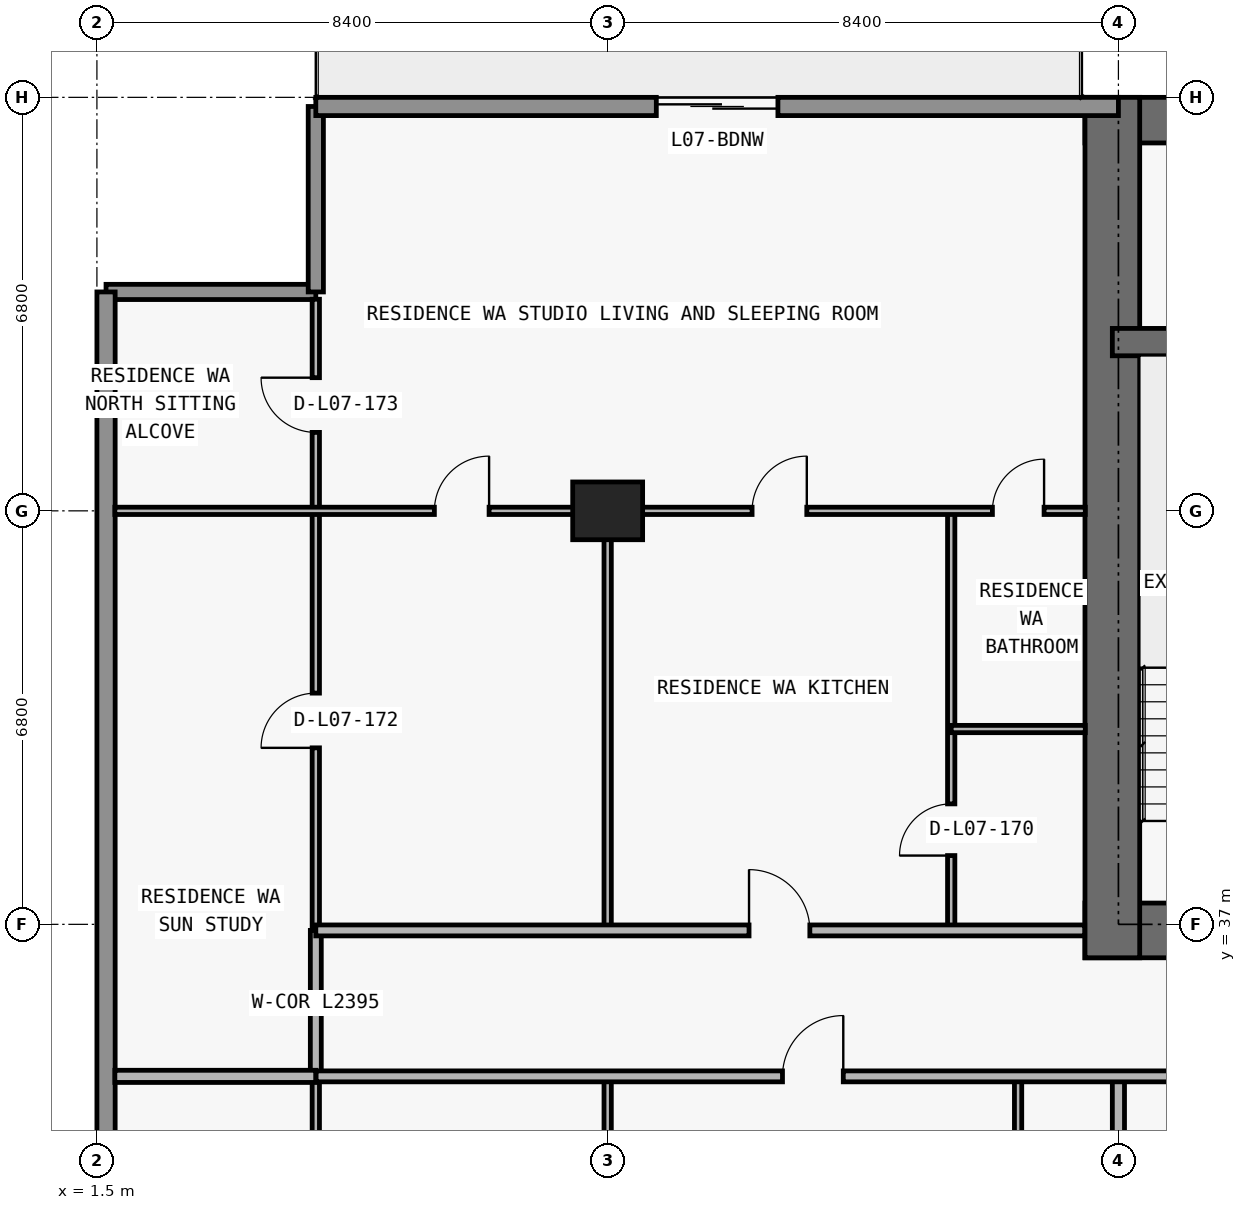
"""IFC4 building model, lengths in metres.
Left out: names, types, materials, properties, quantities, classifications, styles, units other than length and angle.
Written with IfcOpenShell. Run it as: python <this file> out.ifc"""

import sys

from ifc_helpers import new_model, si_unit, direction, frame, frame_2d, origin, origin_2d, place, context, subcontext, project, spatial, rectangle, extrude, element, fill, save


model = new_model("IFC4")
c1 = context("Model", 3, precision=1e-05, world=origin(), true_north=direction((0.0, 1.0)))
c2 = subcontext(c1, "Body", "Model", "MODEL_VIEW")
j1 = project(units=[si_unit("LENGTHUNIT", "METRE"), si_unit("PLANEANGLEUNIT", "RADIAN")], contexts=[c1])
p1 = place(None, origin())
s1 = spatial("IfcSite", under=j1, at=p1, CompositionType="ELEMENT")
p2 = place(p1, origin())
s2 = spatial("IfcBuilding", under=s1, at=p2, CompositionType="ELEMENT")
p3 = place(p2, frame((0.0, 0.0, 33.3)))
s3 = spatial("IfcBuildingStorey", under=s2, at=p3, CompositionType="ELEMENT", Elevation=33.3)
p4 = place(p3, frame((9.9, 43.8, 0.0), z_axis=(0.0, 0.0, 1.0), x_axis=(1.0, 0.0, 0.0)))
e1 = element("IfcColumn", 1, at=p4, inside=s3, PredefinedType="COLUMN", context=c2, shape_type="SweptSolid", body=[
    extrude(rectangle(XDim=1.15, YDim=0.95, at=origin_2d()), origin(), (0.0, 0.0, 1.0), 3.05),
])
p5 = place(p3, frame((17.75, 36.9, 0.0), z_axis=(0.0, 0.0, 1.0), x_axis=(1.0, 0.0, 0.0)))
e2 = element("IfcWall", 2, at=p5, inside=s3, PredefinedType="SHEAR", context=c2, shape_type="SweptSolid", body=[
    extrude(rectangle(XDim=42.3, YDim=0.9, at=frame_2d((21.15, 0.0))), origin(), (0.0, 0.0, 1.0), 3.05),
])
p6 = place(p5, frame((14.55, 0.0, 0.0)))
e3 = element("IfcOpeningElement", 3, at=p6, cuts=e2, PredefinedType="OPENING", context=c2, shape_type="SweptSolid", body=[
    extrude(rectangle(XDim=1.1, YDim=2.15, at=frame_2d((0.55, 1.075))), frame((0.0, 0.46, 0.0), z_axis=(0.0, -1.0, 0.0), x_axis=(1.0, 0.0, 0.0)), (0.0, 0.0, 1.0), 0.92),
])
p7 = place(p5, frame((6.4, 0.0, 0.0)))
e4 = element("IfcOpeningElement", 4, at=p7, cuts=e2, PredefinedType="OPENING", context=c2, shape_type="SweptSolid", body=[
    extrude(rectangle(XDim=1.05, YDim=2.15, at=frame_2d((0.525, 1.075))), frame((0.0, 0.46, 0.0), z_axis=(0.0, -1.0, 0.0), x_axis=(1.0, 0.0, 0.0)), (0.0, 0.0, 1.0), 0.92),
])
p8 = place(p5, frame((34.9, 0.0, 0.0)))
e5 = element("IfcOpeningElement", 5, at=p8, cuts=e2, PredefinedType="OPENING", context=c2, shape_type="SweptSolid", body=[
    extrude(rectangle(XDim=1.05, YDim=2.15, at=frame_2d((0.525, 1.075))), frame((0.0, 0.46, 0.0), z_axis=(0.0, -1.0, 0.0), x_axis=(1.0, 0.0, 0.0)), (0.0, 0.0, 1.0), 0.92),
])
p9 = place(p5, frame((11.012, 0.0, 0.0)))
e6 = element("IfcOpeningElement", 6, at=p9, cuts=e2, PredefinedType="OPENING", context=c2, shape_type="SweptSolid", body=[
    extrude(rectangle(XDim=1.05, YDim=2.15, at=frame_2d((0.525, 1.075))), frame((0.0, 0.46, 0.0), z_axis=(0.0, -1.0, 0.0), x_axis=(1.0, 0.0, 0.0)), (0.0, 0.0, 1.0), 0.92),
])
p10 = place(p5, frame((24.25, 0.0, 0.0)))
e7 = element("IfcOpeningElement", 7, at=p10, cuts=e2, PredefinedType="OPENING", context=c2, shape_type="SweptSolid", body=[
    extrude(rectangle(XDim=1.05, YDim=2.15, at=frame_2d((0.525, 1.075))), frame((0.0, 0.46, 0.0), z_axis=(0.0, -1.0, 0.0), x_axis=(1.0, 0.0, 0.0)), (0.0, 0.0, 1.0), 0.92),
])
p11 = place(p3, frame((17.75, 50.225, 0.0), z_axis=(0.0, 0.0, 1.0), x_axis=(1.0, 0.0, 0.0)))
e8 = element("IfcWall", 8, at=p11, inside=s3, PredefinedType="SHEAR", context=c2, shape_type="SweptSolid", body=[
    extrude(rectangle(XDim=42.3, YDim=0.75, at=frame_2d((21.15, 0.0))), origin(), (0.0, 0.0, 1.0), 3.05),
])
p12 = place(p3, frame((18.2, 36.45, 0.0), z_axis=(0.0, 0.0, 1.0), x_axis=(0.0, 1.0, 0.0)))
e9 = element("IfcWall", 9, at=p12, inside=s3, PredefinedType="SHEAR", context=c2, shape_type="SweptSolid", body=[
    extrude(rectangle(XDim=14.15, YDim=0.9, at=frame_2d((7.075, 0.0))), origin(), (0.0, 0.0, 1.0), 3.05),
])
p13 = place(p3, frame((18.2, 46.575, 0.0), z_axis=(0.0, 0.0, 1.0), x_axis=(1.0, 0.0, 0.0)))
e10 = element("IfcWall", 10, at=p13, inside=s3, PredefinedType="SHEAR", context=c2, shape_type="SweptSolid", body=[
    extrude(rectangle(XDim=41.4, YDim=0.45, at=frame_2d((20.7, 0.0))), origin(), (0.0, 0.0, 1.0), 3.05),
])
p14 = place(p13, frame((7.675, 0.0, 0.0)))
e11 = element("IfcOpeningElement", 11, at=p14, cuts=e10, PredefinedType="OPENING", context=c2, shape_type="SweptSolid", body=[
    extrude(rectangle(XDim=1.05, YDim=2.15, at=frame_2d((0.525, 1.075))), frame((0.0, 0.235, 0.0), z_axis=(0.0, -1.0, 0.0), x_axis=(1.0, 0.0, 0.0)), (0.0, 0.0, 1.0), 0.47),
])
p15 = place(p13, frame((32.725, 0.0, 0.0)))
e12 = element("IfcOpeningElement", 12, at=p15, cuts=e10, PredefinedType="OPENING", context=c2, shape_type="SweptSolid", body=[
    extrude(rectangle(XDim=1.05, YDim=2.15, at=frame_2d((0.525, 1.075))), frame((0.0, 0.235, 0.0), z_axis=(0.0, -1.0, 0.0), x_axis=(1.0, 0.0, 0.0)), (0.0, 0.0, 1.0), 0.47),
])
p16 = place(p3, frame((1.65, 47.4, 0.0), z_axis=(0.0, 0.0, 1.0), x_axis=(1.0, 0.0, 0.0)))
e13 = element("IfcWall", 13, at=p16, inside=s3, PredefinedType="ELEMENTEDWALL", context=c2, shape_type="SweptSolid", body=[
    extrude(rectangle(XDim=3.45, YDim=0.25, at=frame_2d((1.725, 0.0))), origin(), (0.0, 0.0, 1.0), 3.05),
])
p17 = place(p3, frame((5.1, 47.4, 0.0), z_axis=(0.0, 0.0, 1.0), x_axis=(0.0, 1.0, 0.0)))
e14 = element("IfcWall", 14, at=p17, inside=s3, PredefinedType="ELEMENTEDWALL", context=c2, shape_type="SweptSolid", body=[
    extrude(rectangle(XDim=3.05, YDim=0.25, at=frame_2d((1.525, 0.0))), origin(), (0.0, 0.0, 1.0), 3.05),
])
p18 = place(p3, frame((1.65, 26.8, 0.0), z_axis=(0.0, 0.0, 1.0), x_axis=(0.0, 1.0, 0.0)))
e15 = element("IfcWall", 15, at=p18, inside=s3, PredefinedType="STANDARD", context=c2, shape_type="SweptSolid", body=[
    extrude(rectangle(XDim=20.6, YDim=0.3, at=frame_2d((10.3, 0.0))), origin(), (0.0, 0.0, 1.0), 3.05),
])
p19 = place(p3, frame((5.1, 50.45, 0.0), z_axis=(0.0, 0.0, 1.0), x_axis=(1.0, 0.0, 0.0)))
e16 = element("IfcWall", 16, at=p19, inside=s3, PredefinedType="STANDARD", context=c2, shape_type="SweptSolid", body=[
    extrude(rectangle(XDim=13.2, YDim=0.3, at=frame_2d((6.6, 0.0))), origin(), (0.0, 0.0, 1.0), 3.05),
])
p20 = place(p19, frame((5.6, 0.0, 0.0)))
e17 = element("IfcOpeningElement", 17, at=p20, cuts=e16, PredefinedType="OPENING", context=c2, shape_type="SweptSolid", body=[
    extrude(rectangle(XDim=2.0, YDim=2.3, at=frame_2d((1.0, 1.15))), frame((0.0, 0.16, 0.0), z_axis=(0.0, -1.0, 0.0), x_axis=(1.0, 0.0, 0.0)), (0.0, 0.0, 1.0), 0.32),
])
p21 = place(p3, frame((5.1, 27.64, 0.0), z_axis=(0.0, 0.0, 1.0), x_axis=(0.0, 1.0, 0.0)))
e18 = element("IfcWall", 18, at=p21, inside=s3, PredefinedType="PARTITIONING", context=c2, shape_type="SweptSolid", body=[
    extrude(rectangle(XDim=6.86, YDim=0.12, at=frame_2d((3.43, 0.0))), origin(), (0.0, 0.0, 1.0), 3.05),
])
p22 = place(p3, frame((5.1, 34.505, 0.0), z_axis=(0.0, 0.0, 1.0), x_axis=(0.0, 1.0, 0.0)))
e19 = element("IfcWall", 19, at=p22, inside=s3, PredefinedType="PARTITIONING", context=c2, shape_type="SweptSolid", body=[
    extrude(rectangle(XDim=2.395, YDim=0.18, at=frame_2d((1.198, 0.0))), origin(), (0.0, 0.0, 1.0), 3.05),
])
p23 = place(p3, frame((5.1, 36.905, 0.0), z_axis=(0.0, 0.0, 1.0), x_axis=(0.0, 1.0, 0.0)))
e20 = element("IfcWall", 20, at=p23, inside=s3, PredefinedType="PARTITIONING", context=c2, shape_type="SweptSolid", body=[
    extrude(rectangle(XDim=10.375, YDim=0.12, at=frame_2d((5.188, 0.0))), origin(), (0.0, 0.0, 1.0), 3.05),
])
p24 = place(p23, frame((2.998, 0.0, 0.0)))
e21 = element("IfcOpeningElement", 21, at=p24, cuts=e20, PredefinedType="OPENING", context=c2, shape_type="SweptSolid", body=[
    extrude(rectangle(XDim=0.9, YDim=2.15, at=frame_2d((0.45, 1.075))), frame((0.0, 0.07, 0.0), z_axis=(0.0, -1.0, 0.0), x_axis=(1.0, 0.0, 0.0)), (0.0, 0.0, 1.0), 0.14),
])
p25 = place(p23, frame((8.185, 0.0, 0.0)))
e22 = element("IfcOpeningElement", 22, at=p25, cuts=e20, PredefinedType="OPENING", context=c2, shape_type="SweptSolid", body=[
    extrude(rectangle(XDim=0.9, YDim=2.15, at=frame_2d((0.45, 1.075))), frame((0.0, 0.07, 0.0), z_axis=(0.0, -1.0, 0.0), x_axis=(1.0, 0.0, 0.0)), (0.0, 0.0, 1.0), 0.14),
])
p26 = place(p3, frame((9.9, 27.64, 0.0), z_axis=(0.0, 0.0, 1.0), x_axis=(0.0, 1.0, 0.0)))
e23 = element("IfcWall", 23, at=p26, inside=s3, PredefinedType="PARTITIONING", context=c2, shape_type="SweptSolid", body=[
    extrude(rectangle(XDim=6.86, YDim=0.12, at=frame_2d((3.43, 0.0))), origin(), (0.0, 0.0, 1.0), 2.11),
])
p27 = place(p3, frame((9.9, 36.9, 0.0), z_axis=(0.0, 0.0, 1.0), x_axis=(0.0, 1.0, 0.0)))
e24 = element("IfcWall", 24, at=p27, inside=s3, PredefinedType="PARTITIONING", context=c2, shape_type="SweptSolid", body=[
    extrude(rectangle(XDim=6.9, YDim=0.12, at=frame_2d((3.45, 0.0))), origin(), (0.0, 0.0, 1.0), 2.11),
])
p28 = place(p3, frame((15.55, 36.9, 0.0), z_axis=(0.0, 0.0, 1.0), x_axis=(0.0, 1.0, 0.0)))
e25 = element("IfcWall", 25, at=p28, inside=s3, PredefinedType="PARTITIONING", context=c2, shape_type="SweptSolid", body=[
    extrude(rectangle(XDim=6.9, YDim=0.12, at=frame_2d((3.45, 0.0))), origin(), (0.0, 0.0, 1.0), 3.05),
])
p29 = place(p28, frame((1.231, 0.0, 0.0)))
e26 = element("IfcOpeningElement", 26, at=p29, cuts=e25, PredefinedType="OPENING", context=c2, shape_type="SweptSolid", body=[
    extrude(rectangle(XDim=0.85, YDim=2.1, at=frame_2d((0.425, 1.05))), frame((0.0, 0.07, 0.0), z_axis=(0.0, -1.0, 0.0), x_axis=(1.0, 0.0, 0.0)), (0.0, 0.0, 1.0), 0.14),
])
p30 = place(p3, frame((16.65, 27.64, 0.0), z_axis=(0.0, 0.0, 1.0), x_axis=(0.0, 1.0, 0.0)))
e27 = element("IfcWall", 27, at=p30, inside=s3, PredefinedType="PARTITIONING", context=c2, shape_type="SweptSolid", body=[
    extrude(rectangle(XDim=6.86, YDim=0.12, at=frame_2d((3.43, 0.0))), origin(), (0.0, 0.0, 1.0), 3.05),
])
p31 = place(p30, frame((3.005, 0.0, 0.0)))
e28 = element("IfcOpeningElement", 28, at=p31, cuts=e27, PredefinedType="OPENING", context=c2, shape_type="SweptSolid", body=[
    extrude(rectangle(XDim=0.85, YDim=2.1, at=frame_2d((0.425, 1.05))), frame((0.0, 0.07, 0.0), z_axis=(0.0, -1.0, 0.0), x_axis=(1.0, 0.0, 0.0)), (0.0, 0.0, 1.0), 0.14),
])
p32 = place(p3, frame((18.3, 27.64, 0.0), z_axis=(0.0, 0.0, 1.0), x_axis=(0.0, 1.0, 0.0)))
e29 = element("IfcWall", 29, at=p32, inside=s3, PredefinedType="PARTITIONING", context=c2, shape_type="SweptSolid", body=[
    extrude(rectangle(XDim=6.86, YDim=0.2, at=frame_2d((3.43, 0.0))), origin(), (0.0, 0.0, 1.0), 2.11),
])
p33 = place(p3, frame((1.795, 34.5, 0.0), z_axis=(0.0, 0.0, 1.0), x_axis=(1.0, 0.0, 0.0)))
e30 = element("IfcWall", 30, at=p33, inside=s3, PredefinedType="PARTITIONING", context=c2, shape_type="SweptSolid", body=[
    extrude(rectangle(XDim=3.305, YDim=0.2, at=frame_2d((1.653, 0.0))), origin(), (0.0, 0.0, 1.0), 3.05),
])
p34 = place(p3, frame((5.105, 34.5, 0.0), z_axis=(0.0, 0.0, 1.0), x_axis=(1.0, 0.0, 0.0)))
e31 = element("IfcWall", 31, at=p34, inside=s3, PredefinedType="PARTITIONING", context=c2, shape_type="SweptSolid", body=[
    extrude(rectangle(XDim=50.781, YDim=0.18, at=frame_2d((25.391, 0.0))), origin(), (0.0, 0.0, 1.0), 3.05),
])
p35 = place(p34, frame((7.67, 0.0, 0.0)))
e32 = element("IfcOpeningElement", 32, at=p35, cuts=e31, PredefinedType="OPENING", context=c2, shape_type="SweptSolid", body=[
    extrude(rectangle(XDim=1.0, YDim=2.2, at=frame_2d((0.5, 1.1))), frame((0.0, 0.1, 0.0), z_axis=(0.0, -1.0, 0.0), x_axis=(1.0, 0.0, 0.0)), (0.0, 0.0, 1.0), 0.2),
])
p36 = place(p34, frame((16.07, 0.0, 0.0)))
e33 = element("IfcOpeningElement", 33, at=p36, cuts=e31, PredefinedType="OPENING", context=c2, shape_type="SweptSolid", body=[
    extrude(rectangle(XDim=1.0, YDim=2.2, at=frame_2d((0.5, 1.1))), frame((0.0, 0.1, 0.0), z_axis=(0.0, -1.0, 0.0), x_axis=(1.0, 0.0, 0.0)), (0.0, 0.0, 1.0), 0.2),
])
p37 = place(p34, frame((24.47, 0.0, 0.0)))
e34 = element("IfcOpeningElement", 34, at=p37, cuts=e31, PredefinedType="OPENING", context=c2, shape_type="SweptSolid", body=[
    extrude(rectangle(XDim=1.0, YDim=2.2, at=frame_2d((0.5, 1.1))), frame((0.0, 0.1, 0.0), z_axis=(0.0, -1.0, 0.0), x_axis=(1.0, 0.0, 0.0)), (0.0, 0.0, 1.0), 0.2),
])
p38 = place(p34, frame((32.545, 0.0, 0.0)))
e35 = element("IfcOpeningElement", 35, at=p38, cuts=e31, PredefinedType="OPENING", context=c2, shape_type="SweptSolid", body=[
    extrude(rectangle(XDim=1.0, YDim=2.2, at=frame_2d((0.5, 1.1))), frame((0.0, 0.1, 0.0), z_axis=(0.0, -1.0, 0.0), x_axis=(1.0, 0.0, 0.0)), (0.0, 0.0, 1.0), 0.2),
])
p39 = place(p34, frame((47.888, 0.0, 0.0)))
e36 = element("IfcOpeningElement", 36, at=p39, cuts=e31, PredefinedType="OPENING", context=c2, shape_type="SweptSolid", body=[
    extrude(rectangle(XDim=1.0, YDim=2.2, at=frame_2d((0.5, 1.1))), frame((0.0, 0.1, 0.0), z_axis=(0.0, -1.0, 0.0), x_axis=(1.0, 0.0, 0.0)), (0.0, 0.0, 1.0), 0.2),
])
p40 = place(p3, frame((5.1, 36.9, 0.0), z_axis=(0.0, 0.0, 1.0), x_axis=(1.0, 0.0, 0.0)))
e37 = element("IfcWall", 37, at=p40, inside=s3, PredefinedType="PARTITIONING", context=c2, shape_type="SweptSolid", body=[
    extrude(rectangle(XDim=12.645, YDim=0.18, at=frame_2d((6.323, 0.0))), origin(), (0.0, 0.0, 1.0), 3.05),
])
p41 = place(p40, frame((7.125, 0.0, 0.0)))
e38 = element("IfcOpeningElement", 38, at=p41, cuts=e37, PredefinedType="OPENING", context=c2, shape_type="SweptSolid", body=[
    extrude(rectangle(XDim=1.0, YDim=2.2, at=frame_2d((0.5, 1.1))), frame((0.0, 0.1, 0.0), z_axis=(0.0, -1.0, 0.0), x_axis=(1.0, 0.0, 0.0)), (0.0, 0.0, 1.0), 0.2),
])
p42 = place(p3, frame((15.55, 40.212, 0.0), z_axis=(0.0, 0.0, 1.0), x_axis=(1.0, 0.0, 0.0)))
e39 = element("IfcWall", 39, at=p42, inside=s3, PredefinedType="PARTITIONING", context=c2, shape_type="SweptSolid", body=[
    extrude(rectangle(XDim=2.205, YDim=0.12, at=frame_2d((1.103, 0.0))), origin(), (0.0, 0.0, 1.0), 3.05),
])
p43 = place(p3, frame((1.795, 43.8, 0.0), z_axis=(0.0, 0.0, 1.0), x_axis=(1.0, 0.0, 0.0)))
e40 = element("IfcWall", 40, at=p43, inside=s3, PredefinedType="PARTITIONING", context=c2, shape_type="SweptSolid", body=[
    extrude(rectangle(XDim=15.96, YDim=0.12, at=frame_2d((7.98, 0.0))), origin(), (0.0, 0.0, 1.0), 2.339),
])
p44 = place(p43, frame((5.255, 0.0, 0.0)))
e41 = element("IfcOpeningElement", 41, at=p44, cuts=e40, PredefinedType="OPENING", context=c2, shape_type="SweptSolid", body=[
    extrude(rectangle(XDim=0.9, YDim=2.15, at=frame_2d((0.45, 1.075))), frame((0.0, 0.07, 0.0), z_axis=(0.0, -1.0, 0.0), x_axis=(1.0, 0.0, 0.0)), (0.0, 0.0, 1.0), 0.14),
])
p45 = place(p43, frame((10.48, 0.0, 0.0)))
e42 = element("IfcOpeningElement", 42, at=p45, cuts=e40, PredefinedType="OPENING", context=c2, shape_type="SweptSolid", body=[
    extrude(rectangle(XDim=0.9, YDim=2.15, at=frame_2d((0.45, 1.075))), frame((0.0, 0.07, 0.0), z_axis=(0.0, -1.0, 0.0), x_axis=(1.0, 0.0, 0.0)), (0.0, 0.0, 1.0), 0.14),
])
p46 = place(p43, frame((14.433, 0.0, 0.0)))
e43 = element("IfcOpeningElement", 43, at=p46, cuts=e40, PredefinedType="OPENING", context=c2, shape_type="SweptSolid", body=[
    extrude(rectangle(XDim=0.85, YDim=2.1, at=frame_2d((0.425, 1.05))), frame((0.0, 0.07, 0.0), z_axis=(0.0, -1.0, 0.0), x_axis=(1.0, 0.0, 0.0)), (0.0, 0.0, 1.0), 0.14),
])
p47 = place(p20, origin())
e44 = element("IfcDoor", 44, at=p47, inside=s3, OperationType="DOUBLE_DOOR_SLIDING", PredefinedType="DOOR", context=c2, shape_type="SweptSolid", body=[
    extrude(rectangle(XDim=2.0, YDim=2.3, at=frame_2d((1.0, 1.15))), frame((0.0, 0.025, 0.0), z_axis=(0.0, -1.0, 0.0), x_axis=(1.0, 0.0, 0.0)), (0.0, 0.0, 1.0), 0.05),
])
fill(e17, e44)
p48 = place(p35, origin())
e45 = element("IfcDoor", 45, at=p48, inside=s3, OperationType="SINGLE_SWING_RIGHT", PredefinedType="DOOR", context=c2, shape_type="SweptSolid", body=[
    extrude(rectangle(XDim=1.0, YDim=2.2, at=frame_2d((0.5, 1.1))), frame((0.0, 0.025, 0.0), z_axis=(0.0, -1.0, 0.0), x_axis=(1.0, 0.0, 0.0)), (0.0, 0.0, 1.0), 0.05),
])
fill(e32, e45)
p49 = place(p44, origin())
e46 = element("IfcDoor", 46, at=p49, inside=s3, OperationType="SINGLE_SWING_RIGHT", PredefinedType="DOOR", context=c2, shape_type="SweptSolid", body=[
    extrude(rectangle(XDim=0.9, YDim=2.15, at=frame_2d((0.45, 1.075))), frame((0.0, 0.025, 0.0), z_axis=(0.0, -1.0, 0.0), x_axis=(1.0, 0.0, 0.0)), (0.0, 0.0, 1.0), 0.05),
])
fill(e41, e46)
p50 = place(p41, origin())
e47 = element("IfcDoor", 47, at=p50, inside=s3, OperationType="SINGLE_SWING_LEFT", PredefinedType="DOOR", context=c2, shape_type="SweptSolid", body=[
    extrude(rectangle(XDim=1.0, YDim=2.2, at=frame_2d((0.5, 1.1))), frame((0.0, 0.025, 0.0), z_axis=(0.0, -1.0, 0.0), x_axis=(1.0, 0.0, 0.0)), (0.0, 0.0, 1.0), 0.05),
])
fill(e38, e47)
p51 = place(p45, origin())
e48 = element("IfcDoor", 48, at=p51, inside=s3, OperationType="SINGLE_SWING_RIGHT", PredefinedType="DOOR", context=c2, shape_type="SweptSolid", body=[
    extrude(rectangle(XDim=0.9, YDim=2.15, at=frame_2d((0.45, 1.075))), frame((0.0, 0.025, 0.0), z_axis=(0.0, -1.0, 0.0), x_axis=(1.0, 0.0, 0.0)), (0.0, 0.0, 1.0), 0.05),
])
fill(e42, e48)
p52 = place(p29, origin())
e49 = element("IfcDoor", 49, at=p52, inside=s3, OperationType="SINGLE_SWING_LEFT", PredefinedType="DOOR", context=c2, shape_type="SweptSolid", body=[
    extrude(rectangle(XDim=0.85, YDim=2.1, at=frame_2d((0.425, 1.05))), frame((0.0, 0.025, 0.0), z_axis=(0.0, -1.0, 0.0), x_axis=(1.0, 0.0, 0.0)), (0.0, 0.0, 1.0), 0.05),
])
fill(e26, e49)
p53 = place(p46, origin())
e50 = element("IfcDoor", 50, at=p53, inside=s3, OperationType="SINGLE_SWING_RIGHT", PredefinedType="DOOR", context=c2, shape_type="SweptSolid", body=[
    extrude(rectangle(XDim=0.85, YDim=2.1, at=frame_2d((0.425, 1.05))), frame((0.0, 0.025, 0.0), z_axis=(0.0, -1.0, 0.0), x_axis=(1.0, 0.0, 0.0)), (0.0, 0.0, 1.0), 0.05),
])
fill(e43, e50)
p54 = place(p24, origin())
e51 = element("IfcDoor", 51, at=p54, inside=s3, OperationType="SINGLE_SWING_LEFT", PredefinedType="DOOR", context=c2, shape_type="SweptSolid", body=[
    extrude(rectangle(XDim=0.9, YDim=2.15, at=frame_2d((0.45, 1.075))), frame((0.0, 0.025, 0.0), z_axis=(0.0, -1.0, 0.0), x_axis=(1.0, 0.0, 0.0)), (0.0, 0.0, 1.0), 0.05),
])
fill(e21, e51)
p55 = place(p25, origin())
e52 = element("IfcDoor", 52, at=p55, inside=s3, OperationType="SINGLE_SWING_RIGHT", PredefinedType="DOOR", context=c2, shape_type="SweptSolid", body=[
    extrude(rectangle(XDim=0.9, YDim=2.15, at=frame_2d((0.45, 1.075))), frame((0.0, 0.025, 0.0), z_axis=(0.0, -1.0, 0.0), x_axis=(1.0, 0.0, 0.0)), (0.0, 0.0, 1.0), 0.05),
])
fill(e22, e52)
save(model, sys.argv[1])
